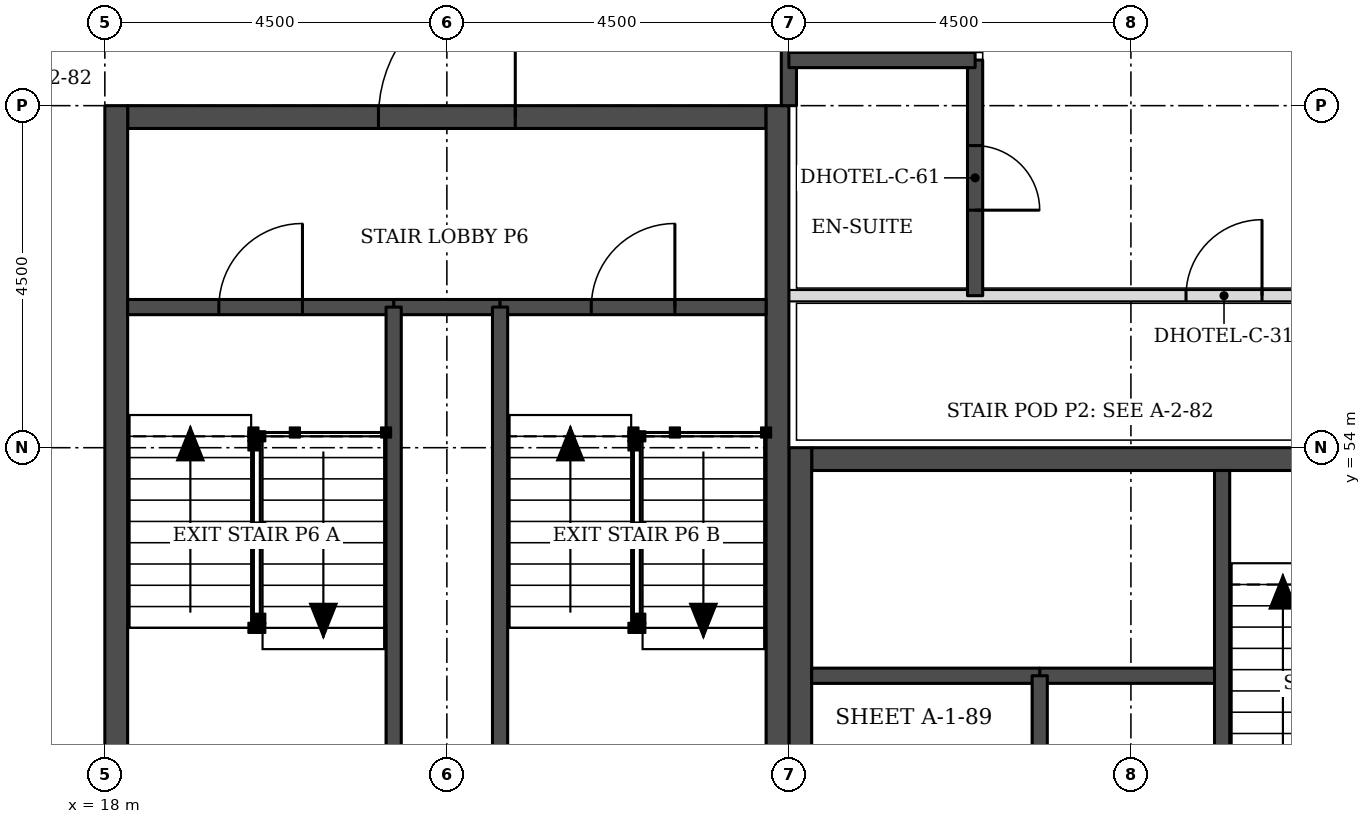
"""IFC4 building model, lengths in metres.
Left out: names, types, materials, properties, quantities, classifications, styles, units other than length and angle.
Written with IfcOpenShell. Run it as: python <this file> out.ifc"""

import sys

from ifc_helpers import new_model, si_unit, direction, frame, frame_2d, origin, place, context, subcontext, project, spatial, rectangle, extrude, element, fill, save


model = new_model("IFC4")
c1 = context("Model", 3, precision=1e-05, world=origin(), true_north=direction((0.0, 1.0)))
c2 = subcontext(c1, "Body", "Model", "MODEL_VIEW")
j1 = project(units=[si_unit("LENGTHUNIT", "METRE"), si_unit("PLANEANGLEUNIT", "RADIAN")], contexts=[c1])
p1 = place(None, origin())
s1 = spatial("IfcSite", under=j1, at=p1, CompositionType="ELEMENT")
p2 = place(p1, origin())
s2 = spatial("IfcBuilding", under=s1, at=p2, CompositionType="ELEMENT")
p3 = place(p2, frame((0.0, 0.0, 56.1)))
s3 = spatial("IfcBuildingStorey", under=s2, at=p3, CompositionType="ELEMENT", Elevation=56.1)
p4 = place(p3, frame((27.3, 53.85, 0.0), z_axis=(0.0, 0.0, 1.0), x_axis=(1.0, 0.0, 0.0)))
e1 = element("IfcWall", 1, at=p4, inside=s3, PredefinedType="SHEAR", context=c2, shape_type="SweptSolid", body=[
    extrude(rectangle(XDim=8.4, YDim=0.3, at=frame_2d((4.2, 0.0))), origin(), (0.0, 0.0, 1.0), 3.3),
])
p5 = place(p4, frame((6.4, 0.0, 0.0)))
e2 = element("IfcOpeningElement", 2, at=p5, cuts=e1, PredefinedType="OPENING", context=c2, shape_type="SweptSolid", body=[
    extrude(rectangle(XDim=1.1, YDim=2.1, at=frame_2d((0.55, 1.05))), frame((0.0, 0.16, 0.0), z_axis=(0.0, -1.0, 0.0), x_axis=(1.0, 0.0, 0.0)), (0.0, 0.0, 1.0), 0.32),
])
p6 = place(p3, frame((27.15, 45.0, 0.0), z_axis=(0.0, 0.0, 1.0), x_axis=(0.0, 1.0, 0.0)))
e3 = element("IfcWall", 3, at=p6, inside=s3, PredefinedType="SHEAR", context=c2, shape_type="SweptSolid", body=[
    extrude(rectangle(XDim=9.0, YDim=0.3, at=frame_2d((4.5, 0.0))), origin(), (0.0, 0.0, 1.0), 3.3),
])
p7 = place(p6, frame((0.4, 0.0, 0.0)))
e4 = element("IfcOpeningElement", 4, at=p7, cuts=e3, PredefinedType="OPENING", context=c2, shape_type="SweptSolid", body=[
    extrude(rectangle(XDim=1.1, YDim=2.1, at=frame_2d((0.55, 1.05))), frame((0.0, 0.16, 0.0), z_axis=(0.0, -1.0, 0.0), x_axis=(1.0, 0.0, 0.0)), (0.0, 0.0, 1.0), 0.32),
])
p8 = place(p3, frame((18.3, 58.35, 0.0), z_axis=(0.0, 0.0, 1.0), x_axis=(1.0, 0.0, 0.0)))
e5 = element("IfcWall", 5, at=p8, inside=s3, PredefinedType="SHEAR", context=c2, shape_type="SweptSolid", body=[
    extrude(rectangle(XDim=8.4, YDim=0.3, at=frame_2d((4.2, 0.0))), origin(), (0.0, 0.0, 1.0), 3.3),
])
p9 = place(p8, frame((3.3, 0.0, 0.0)))
e6 = element("IfcOpeningElement", 6, at=p9, cuts=e5, PredefinedType="OPENING", context=c2, shape_type="SweptSolid", body=[
    extrude(rectangle(XDim=1.8, YDim=2.1, at=frame_2d((0.9, 1.05))), frame((0.0, 0.16, 0.0), z_axis=(0.0, -1.0, 0.0), x_axis=(1.0, 0.0, 0.0)), (0.0, 0.0, 1.0), 0.32),
])
for number, where, z_axis, x_axis in (
    (7, (18.15, 49.5, 0.0), (0.0, 0.0, 1.0), (0.0, 1.0, 0.0)),
    (8, (26.85, 49.5, 0.0), (0.0, 0.0, 1.0), (0.0, 1.0, 0.0)),
):
    element("IfcWall", number, at=place(p3, frame(where, z_axis=z_axis, x_axis=x_axis)), inside=s3, PredefinedType="SHEAR", context=c2, shape_type="SweptSolid", body=[
        extrude(rectangle(XDim=9.0, YDim=0.3, at=frame_2d((4.5, 0.0))), origin(), (0.0, 0.0, 1.0), 3.3),
    ])
p10 = place(p3, frame((17.73, 63.826, 0.0), z_axis=(0.0, 0.0, 1.0), x_axis=(-0.707106781187, -0.707106781187, 0.0)))
e9 = element("IfcWall", 9, at=p10, inside=s3, PredefinedType="STANDARD", context=c2, shape_type="SweptSolid", body=[
    extrude(rectangle(XDim=7.151, YDim=0.35, at=frame_2d((3.576, 0.0))), origin(), (0.0, 0.0, 1.0), 3.055),
])
p11 = place(p10, frame((1.926, 0.0, 0.8)))
e10 = element("IfcOpeningElement", 10, at=p11, cuts=e9, PredefinedType="OPENING", context=c2, shape_type="SweptSolid", body=[
    extrude(rectangle(XDim=3.3, YDim=1.5, at=frame_2d((1.65, 0.75))), frame((0.0, 0.185, 0.0), z_axis=(0.0, -1.0, 0.0), x_axis=(1.0, 0.0, 0.0)), (0.0, 0.0, 1.0), 0.37),
])
p12 = place(p3, frame((27.0, 56.0, 0.0), z_axis=(0.0, 0.0, 1.0), x_axis=(1.0, 0.0, 0.0)))
e11 = element("IfcWall", 11, at=p12, inside=s3, PredefinedType="PARTITIONING", context=c2, shape_type="SweptSolid", body=[
    extrude(rectangle(XDim=16.0, YDim=0.15, at=frame_2d((8.0, 0.0))), origin(), (0.0, 0.0, 1.0), 3.08),
])
p13 = place(p12, frame((5.225, 0.0, 0.0)))
e12 = element("IfcOpeningElement", 12, at=p13, cuts=e11, PredefinedType="OPENING", context=c2, shape_type="SweptSolid", body=[
    extrude(rectangle(XDim=1.0, YDim=2.1, at=frame_2d((0.5, 1.05))), frame((0.0, 0.085, 0.0), z_axis=(0.0, -1.0, 0.0), x_axis=(1.0, 0.0, 0.0)), (0.0, 0.0, 1.0), 0.17),
])
p14 = place(p3, frame((27.0, 58.5, 0.0), z_axis=(0.0, 0.0, 1.0), x_axis=(0.0, 1.0, 0.0)))
e13 = element("IfcWall", 13, at=p14, inside=s3, PredefinedType="SOLIDWALL", context=c2, shape_type="SweptSolid", body=[
    extrude(rectangle(XDim=3.9, YDim=0.2, at=frame_2d((1.95, 0.0))), origin(), (0.0, 0.0, 1.0), 3.08),
])
p15 = place(p3, frame((29.45, 56.0, 0.0), z_axis=(0.0, 0.0, 1.0), x_axis=(0.0, 1.0, 0.0)))
e14 = element("IfcWall", 14, at=p15, inside=s3, PredefinedType="SOLIDWALL", context=c2, shape_type="SweptSolid", body=[
    extrude(rectangle(XDim=3.1, YDim=0.2, at=frame_2d((1.55, 0.0))), origin(), (0.0, 0.0, 1.0), 3.08),
])
p16 = place(p15, frame((1.125, 0.0, 0.0)))
e15 = element("IfcOpeningElement", 15, at=p16, cuts=e14, PredefinedType="OPENING", context=c2, shape_type="SweptSolid", body=[
    extrude(rectangle(XDim=0.85, YDim=2.1, at=frame_2d((0.425, 1.05))), frame((0.0, 0.11, 0.0), z_axis=(0.0, -1.0, 0.0), x_axis=(1.0, 0.0, 0.0)), (0.0, 0.0, 1.0), 0.22),
])
p17 = place(p3, frame((27.0, 59.1, 0.0), z_axis=(0.0, 0.0, 1.0), x_axis=(1.0, 0.0, 0.0)))
e16 = element("IfcWall", 16, at=p17, inside=s3, PredefinedType="SOLIDWALL", context=c2, shape_type="SweptSolid", body=[
    extrude(rectangle(XDim=2.45, YDim=0.2, at=frame_2d((1.225, 0.0))), origin(), (0.0, 0.0, 1.0), 3.08),
])
p18 = place(p3, frame((30.3, 51.0, 0.0), z_axis=(0.0, 0.0, 1.0), x_axis=(1.0, 0.0, 0.0)))
e17 = element("IfcWall", 17, at=p18, inside=s3, PredefinedType="SOLIDWALL", context=c2, shape_type="SweptSolid", body=[
    extrude(rectangle(XDim=2.4, YDim=0.2, at=frame_2d((1.2, 0.0))), origin(), (0.0, 0.0, 1.0), 3.3),
])
p19 = place(p3, frame((27.3, 51.0, 0.0), z_axis=(0.0, 0.0, 1.0), x_axis=(1.0, 0.0, 0.0)))
e18 = element("IfcWall", 18, at=p19, inside=s3, PredefinedType="SOLIDWALL", context=c2, shape_type="SweptSolid", body=[
    extrude(rectangle(XDim=3.0, YDim=0.2, at=frame_2d((1.5, 0.0))), origin(), (0.0, 0.0, 1.0), 3.08),
])
for number, where, z_axis, x_axis in (
    (19, (30.3, 45.3, 0.0), (0.0, 0.0, 1.0), (0.0, 1.0, 0.0)),
    (20, (32.7, 48.0, 0.0), (0.0, 0.0, 1.0), (0.0, 1.0, 0.0)),
):
    element("IfcWall", number, at=place(p3, frame(where, z_axis=z_axis, x_axis=x_axis)), inside=s3, PredefinedType="SOLIDWALL", context=c2, shape_type="SweptSolid", body=[
        extrude(rectangle(XDim=5.7, YDim=0.2, at=frame_2d((2.85, 0.0))), origin(), (0.0, 0.0, 1.0), 3.08),
    ])
p20 = place(p3, frame((21.8, 55.85, 0.0), z_axis=(0.0, 0.0, 1.0), x_axis=(1.0, 0.0, 0.0)))
e21 = element("IfcWall", 21, at=p20, inside=s3, PredefinedType="SOLIDWALL", context=c2, shape_type="SweptSolid", body=[
    extrude(rectangle(XDim=1.4, YDim=0.2, at=frame_2d((0.7, 0.0))), origin(), (0.0, 0.0, 1.0), 3.08),
])
p21 = place(p3, frame((18.3, 55.85, 0.0), z_axis=(0.0, 0.0, 1.0), x_axis=(1.0, 0.0, 0.0)))
e22 = element("IfcWall", 22, at=p21, inside=s3, PredefinedType="SOLIDWALL", context=c2, shape_type="SweptSolid", body=[
    extrude(rectangle(XDim=3.5, YDim=0.2, at=frame_2d((1.75, 0.0))), origin(), (0.0, 0.0, 1.0), 3.08),
])
p22 = place(p21, frame((1.2, 0.0, 0.0)))
e23 = element("IfcOpeningElement", 23, at=p22, cuts=e22, PredefinedType="OPENING", context=c2, shape_type="SweptSolid", body=[
    extrude(rectangle(XDim=1.1, YDim=2.1, at=frame_2d((0.55, 1.05))), frame((0.0, 0.11, 0.0), z_axis=(0.0, -1.0, 0.0), x_axis=(1.0, 0.0, 0.0)), (0.0, 0.0, 1.0), 0.22),
])
p23 = place(p3, frame((23.2, 55.85, 0.0), z_axis=(0.0, 0.0, 1.0), x_axis=(1.0, 0.0, 0.0)))
e24 = element("IfcWall", 24, at=p23, inside=s3, PredefinedType="SOLIDWALL", context=c2, shape_type="SweptSolid", body=[
    extrude(rectangle(XDim=3.5, YDim=0.2, at=frame_2d((1.75, 0.0))), origin(), (0.0, 0.0, 1.0), 3.08),
])
p24 = place(p23, frame((1.2, 0.0, 0.0)))
e25 = element("IfcOpeningElement", 25, at=p24, cuts=e24, PredefinedType="OPENING", context=c2, shape_type="SweptSolid", body=[
    extrude(rectangle(XDim=1.1, YDim=2.1, at=frame_2d((0.55, 1.05))), frame((0.0, 0.11, 0.0), z_axis=(0.0, -1.0, 0.0), x_axis=(1.0, 0.0, 0.0)), (0.0, 0.0, 1.0), 0.22),
])
for number, where, z_axis, x_axis in (
    (26, (21.8, 49.8, 0.0), (0.0, 0.0, 1.0), (0.0, 1.0, 0.0)),
    (27, (23.2, 49.8, 0.0), (0.0, 0.0, 1.0), (0.0, 1.0, 0.0)),
):
    element("IfcWall", number, at=place(p3, frame(where, z_axis=z_axis, x_axis=x_axis)), inside=s3, PredefinedType="SOLIDWALL", context=c2, shape_type="SweptSolid", body=[
        extrude(rectangle(XDim=6.05, YDim=0.2, at=frame_2d((3.025, 0.0))), origin(), (0.0, 0.0, 1.0), 3.08),
    ])
p25 = place(p13, origin())
e28 = element("IfcDoor", 28, at=p25, inside=s3, OperationType="SINGLE_SWING_RIGHT", PredefinedType="DOOR", context=c2, shape_type="SweptSolid", body=[
    extrude(rectangle(XDim=1.0, YDim=2.1, at=frame_2d((0.5, 1.05))), frame((0.0, 0.025, 0.0), z_axis=(0.0, -1.0, 0.0), x_axis=(1.0, 0.0, 0.0)), (0.0, 0.0, 1.0), 0.05),
])
fill(e12, e28)
p26 = place(p16, frame((0.85, 0.0, 0.0), z_axis=(0.0, 0.0, 1.0), x_axis=(-1.0, 0.0, 0.0)))
e29 = element("IfcDoor", 29, at=p26, inside=s3, OperationType="SINGLE_SWING_RIGHT", PredefinedType="DOOR", context=c2, shape_type="SweptSolid", body=[
    extrude(rectangle(XDim=0.85, YDim=2.1, at=frame_2d((0.425, 1.05))), frame((0.0, 0.025, 0.0), z_axis=(0.0, -1.0, 0.0), x_axis=(1.0, 0.0, 0.0)), (0.0, 0.0, 1.0), 0.05),
])
fill(e15, e29)
p27 = place(p22, origin())
e30 = element("IfcDoor", 30, at=p27, inside=s3, OperationType="SINGLE_SWING_RIGHT", PredefinedType="DOOR", context=c2, shape_type="SweptSolid", body=[
    extrude(rectangle(XDim=1.1, YDim=2.1, at=frame_2d((0.55, 1.05))), frame((0.0, 0.025, 0.0), z_axis=(0.0, -1.0, 0.0), x_axis=(1.0, 0.0, 0.0)), (0.0, 0.0, 1.0), 0.05),
])
fill(e23, e30)
p28 = place(p24, origin())
e31 = element("IfcDoor", 31, at=p28, inside=s3, OperationType="SINGLE_SWING_RIGHT", PredefinedType="DOOR", context=c2, shape_type="SweptSolid", body=[
    extrude(rectangle(XDim=1.1, YDim=2.1, at=frame_2d((0.55, 1.05))), frame((0.0, 0.025, 0.0), z_axis=(0.0, -1.0, 0.0), x_axis=(1.0, 0.0, 0.0)), (0.0, 0.0, 1.0), 0.05),
])
fill(e25, e31)
p29 = place(p9, origin())
e32 = element("IfcDoor", 32, at=p29, inside=s3, OperationType="SINGLE_SWING_RIGHT", PredefinedType="DOOR", context=c2, shape_type="SweptSolid", body=[
    extrude(rectangle(XDim=1.8, YDim=2.1, at=frame_2d((0.9, 1.05))), frame((0.0, 0.025, 0.0), z_axis=(0.0, -1.0, 0.0), x_axis=(1.0, 0.0, 0.0)), (0.0, 0.0, 1.0), 0.05),
])
fill(e6, e32)
save(model, sys.argv[1])
